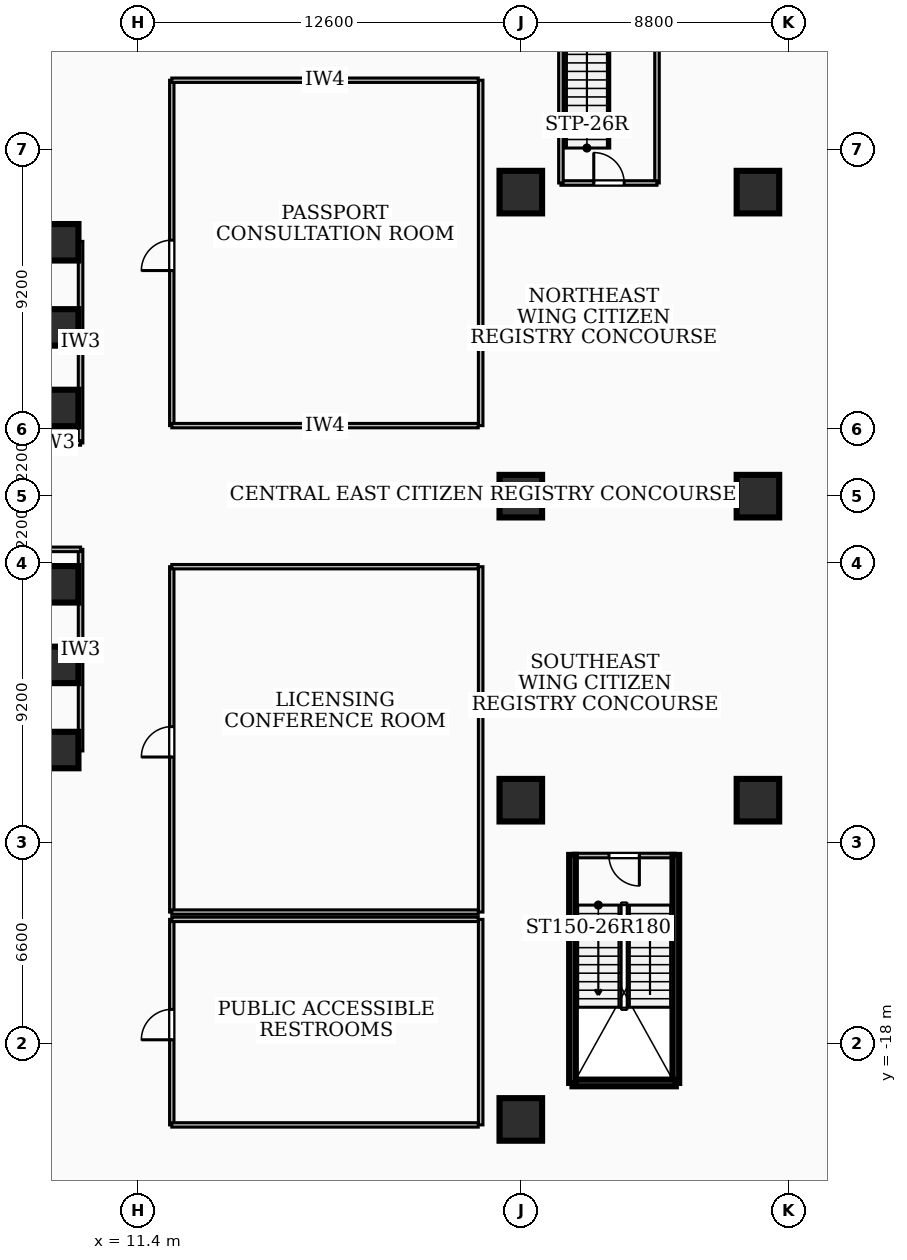
"""IFC4 building model, lengths in metres.
Left out: names, types, materials, properties, quantities, classifications, styles, units other than length and angle.
Written with IfcOpenShell. Run it as: python <this file> out.ifc"""

import sys

from ifc_helpers import new_model, si_unit, direction, frame, frame_2d, origin, origin_2d, place, context, subcontext, project, spatial, rectangle, extrude, element, fill, save


model = new_model("IFC4")
c1 = context("Model", 3, precision=1e-05, world=origin(), true_north=direction((0.0, 1.0)))
c2 = subcontext(c1, "Body", "Model", "MODEL_VIEW")
j1 = project(units=[si_unit("LENGTHUNIT", "METRE"), si_unit("PLANEANGLEUNIT", "RADIAN")], contexts=[c1])
p1 = place(None, origin())
s1 = spatial("IfcSite", under=j1, at=p1, CompositionType="ELEMENT")
p2 = place(p1, origin())
s2 = spatial("IfcBuilding", under=s1, at=p2, CompositionType="ELEMENT")
p3 = place(p2, frame((0.0, 0.0, 5.4)))
s3 = spatial("IfcBuildingStorey", under=s2, at=p3, CompositionType="ELEMENT", Elevation=5.4)
for number, where, z_axis, x_axis in (
    (1, (-8.78, 8.585, 0.0), (0.0, 0.0, 1.0), (1.0, 0.0, 0.0)),
    (2, (8.78, -8.585, 0.0), (0.0, 0.0, 1.0), (-1.0, 0.0, 0.0)),
):
    element("IfcWall", number, at=place(p3, frame(where, z_axis=z_axis, x_axis=x_axis)), inside=s3, PredefinedType="SHEAR", context=c2, shape_type="SweptSolid", body=[
        extrude(rectangle(XDim=17.56, YDim=0.55, at=frame_2d((8.78, 0.0))), origin(), (0.0, 0.0, 1.0), 4.36),
    ])
for number, where, z_axis, x_axis in (
    (3, (25.7, -19.3, 0.0), (0.0, 0.0, 1.0), (0.0, 1.0, 0.0)),
    (4, (29.1, -19.3, 0.0), (0.0, 0.0, 1.0), (0.0, 1.0, 0.0)),
):
    element("IfcWall", number, at=place(p3, frame(where, z_axis=z_axis, x_axis=x_axis)), inside=s3, PredefinedType="SOLIDWALL", context=c2, shape_type="SweptSolid", body=[
        extrude(rectangle(XDim=7.5, YDim=0.22, at=frame_2d((3.75, 0.0))), origin(), (0.0, 0.0, 1.0), 4.36),
    ])
p4 = place(p3, frame((25.7, -19.3, 0.0), z_axis=(0.0, 0.0, 1.0), x_axis=(1.0, 0.0, 0.0)))
e5 = element("IfcWall", 5, at=p4, inside=s3, PredefinedType="SOLIDWALL", context=c2, shape_type="SweptSolid", body=[
    extrude(rectangle(XDim=3.4, YDim=0.22, at=frame_2d((1.7, 0.0))), origin(), (0.0, 0.0, 1.0), 4.36),
])
for number, where, z_axis, x_axis in (
    (6, (8.85, -5.55, 0.0), (0.0, 0.0, 1.0), (1.0, 0.0, 0.0)),
    (7, (8.85, -2.9, 0.0), (0.0, 0.0, 1.0), (1.0, 0.0, 0.0)),
    (8, (8.85, 2.9, 0.0), (0.0, 0.0, 1.0), (1.0, 0.0, 0.0)),
    (9, (8.85, 5.55, 0.0), (0.0, 0.0, 1.0), (1.0, 0.0, 0.0)),
    (10, (8.85, -8.35, 0.0), (0.0, 0.0, 1.0), (1.0, 0.0, 0.0)),
    (11, (8.85, 8.35, 0.0), (0.0, 0.0, 1.0), (1.0, 0.0, 0.0)),
):
    element("IfcColumn", number, at=place(p3, frame(where, z_axis=z_axis, x_axis=x_axis)), inside=s3, PredefinedType="COLUMN", context=c2, shape_type="SweptSolid", body=[
        extrude(rectangle(XDim=1.2, YDim=1.2, at=origin_2d()), origin(), (0.0, 0.0, 1.0), 4.68),
    ])
for number, where, z_axis, x_axis in (
    (12, (31.8, -10.0, 0.0), (0.0, 0.0, 1.0), (1.0, 0.0, 0.0)),
    (13, (31.8, 0.0, 0.0), (0.0, 0.0, 1.0), (1.0, 0.0, 0.0)),
    (14, (31.8, 10.0, 0.0), (0.0, 0.0, 1.0), (1.0, 0.0, 0.0)),
    (15, (24.0, -10.0, 0.0), (0.0, 0.0, 1.0), (1.0, 0.0, 0.0)),
    (16, (24.0, 0.0, 0.0), (0.0, 0.0, 1.0), (1.0, 0.0, 0.0)),
    (17, (24.0, 10.0, 0.0), (0.0, 0.0, 1.0), (1.0, 0.0, 0.0)),
    (18, (24.0, -20.5, 0.0), (0.0, 0.0, 1.0), (1.0, 0.0, 0.0)),
):
    element("IfcColumn", number, at=place(p3, frame(where, z_axis=z_axis, x_axis=x_axis)), inside=s3, PredefinedType="COLUMN", context=c2, shape_type="SweptSolid", body=[
        extrude(rectangle(XDim=1.4, YDim=1.4, at=origin_2d()), origin(), (0.0, 0.0, 1.0), 4.68),
    ])
p5 = place(p3, frame((29.08, -11.82, 0.0), z_axis=(0.0, 0.0, 1.0), x_axis=(-1.0, 0.0, 0.0)))
e19 = element("IfcWall", 19, at=p5, inside=s3, PredefinedType="PARTITIONING", context=c2, shape_type="SweptSolid", body=[
    extrude(rectangle(XDim=3.36, YDim=0.15, at=frame_2d((1.68, 0.0))), origin(), (0.0, 0.0, 1.0), 4.36),
])
p6 = place(p5, frame((1.18, 0.0, 0.0)))
e20 = element("IfcOpeningElement", 20, at=p6, cuts=e19, PredefinedType="OPENING", context=c2, shape_type="SweptSolid", body=[
    extrude(rectangle(XDim=1.0, YDim=2.1, at=frame_2d((0.5, 1.05))), frame((0.0, 0.085, 0.0), z_axis=(0.0, -1.0, 0.0), x_axis=(1.0, 0.0, 0.0)), (0.0, 0.0, 1.0), 0.17),
])
for number, where, z_axis, x_axis in (
    (21, (25.32, 10.3, 0.0), (0.0, 0.0, 1.0), (0.0, 1.0, 0.0)),
    (22, (28.48, 10.3, 0.0), (0.0, 0.0, 1.0), (0.0, 1.0, 0.0)),
):
    element("IfcWall", number, at=place(p3, frame(where, z_axis=z_axis, x_axis=x_axis)), inside=s3, PredefinedType="PARTITIONING", context=c2, shape_type="SweptSolid", body=[
        extrude(rectangle(XDim=9.8, YDim=0.15, at=frame_2d((4.9, 0.0))), origin(), (0.0, 0.0, 1.0), 4.36),
    ])
p7 = place(p3, frame((25.32, 10.3, 0.0), z_axis=(0.0, 0.0, 1.0), x_axis=(1.0, 0.0, 0.0)))
e23 = element("IfcWall", 23, at=p7, inside=s3, PredefinedType="PARTITIONING", context=c2, shape_type="SweptSolid", body=[
    extrude(rectangle(XDim=3.16, YDim=0.15, at=frame_2d((1.58, 0.0))), origin(), (0.0, 0.0, 1.0), 3.37),
])
p8 = place(p7, frame((1.08, 0.0, 0.0)))
e24 = element("IfcOpeningElement", 24, at=p8, cuts=e23, PredefinedType="OPENING", context=c2, shape_type="SweptSolid", body=[
    extrude(rectangle(XDim=1.0, YDim=2.1, at=frame_2d((0.5, 1.05))), frame((0.0, 0.085, 0.0), z_axis=(0.0, -1.0, 0.0), x_axis=(1.0, 0.0, 0.0)), (0.0, 0.0, 1.0), 0.17),
])
p9 = place(p3, frame((9.52, 1.75, 0.0), z_axis=(0.0, 0.0, 1.0), x_axis=(0.0, 1.0, 0.0)))
e25 = element("IfcWall", 25, at=p9, inside=s3, PredefinedType="PARTITIONING", context=c2, shape_type="SweptSolid", body=[
    extrude(rectangle(XDim=6.63, YDim=0.15, at=frame_2d((3.315, 0.0))), origin(), (0.0, 0.0, 1.0), 3.37),
])
p10 = place(p3, frame((7.85, 1.75, 0.0), z_axis=(0.0, 0.0, 1.0), x_axis=(1.0, 0.0, 0.0)))
e26 = element("IfcWall", 26, at=p10, inside=s3, PredefinedType="PARTITIONING", context=c2, shape_type="SweptSolid", body=[
    extrude(rectangle(XDim=1.67, YDim=0.15, at=frame_2d((0.835, 0.0))), origin(), (0.0, 0.0, 1.0), 3.425),
])
p11 = place(p3, frame((9.52, -8.38, 0.0), z_axis=(0.0, 0.0, 1.0), x_axis=(0.0, 1.0, 0.0)))
e27 = element("IfcWall", 27, at=p11, inside=s3, PredefinedType="PARTITIONING", context=c2, shape_type="SweptSolid", body=[
    extrude(rectangle(XDim=6.63, YDim=0.15, at=frame_2d((3.315, 0.0))), origin(), (0.0, 0.0, 1.0), 3.37),
])
p12 = place(p3, frame((7.85, -1.75, 0.0), z_axis=(0.0, 0.0, 1.0), x_axis=(1.0, 0.0, 0.0)))
e28 = element("IfcWall", 28, at=p12, inside=s3, PredefinedType="PARTITIONING", context=c2, shape_type="SweptSolid", body=[
    extrude(rectangle(XDim=1.67, YDim=0.15, at=frame_2d((0.835, 0.0))), origin(), (0.0, 0.0, 1.0), 3.425),
])
p13 = place(p3, frame((12.52, 2.32, 0.0), z_axis=(0.0, 0.0, 1.0), x_axis=(0.0, 1.0, 0.0)))
e29 = element("IfcWall", 29, at=p13, inside=s3, PredefinedType="PARTITIONING", context=c2, shape_type="SweptSolid", body=[
    extrude(rectangle(XDim=11.36, YDim=0.145, at=frame_2d((5.68, 0.0))), origin(), (0.0, 0.0, 1.0), 3.37),
])
p14 = place(p13, frame((5.1, 0.0, 0.0)))
e30 = element("IfcOpeningElement", 30, at=p14, cuts=e29, PredefinedType="OPENING", context=c2, shape_type="SweptSolid", body=[
    extrude(rectangle(XDim=1.0, YDim=2.1, at=frame_2d((0.5, 1.05))), frame((0.0, 0.083, 0.0), z_axis=(0.0, -1.0, 0.0), x_axis=(1.0, 0.0, 0.0)), (0.0, 0.0, 1.0), 0.165),
])
for number, where, z_axis, x_axis in (
    (31, (12.52, 2.32, 0.0), (0.0, 0.0, 1.0), (1.0, 0.0, 0.0)),
    (32, (12.52, 13.68, 0.0), (0.0, 0.0, 1.0), (1.0, 0.0, 0.0)),
):
    element("IfcWall", number, at=place(p3, frame(where, z_axis=z_axis, x_axis=x_axis)), inside=s3, PredefinedType="PARTITIONING", context=c2, shape_type="SweptSolid", body=[
        extrude(rectangle(XDim=10.08, YDim=0.145, at=frame_2d((5.04, 0.0))), origin(), (0.0, 0.0, 1.0), 4.36),
    ])
p15 = place(p3, frame((22.68, 2.32, 0.0), z_axis=(0.0, 0.0, 1.0), x_axis=(0.0, 1.0, 0.0)))
e33 = element("IfcWall", 33, at=p15, inside=s3, PredefinedType="PARTITIONING", context=c2, shape_type="SweptSolid", body=[
    extrude(rectangle(XDim=11.36, YDim=0.15, at=frame_2d((5.68, 0.0))), origin(), (0.0, 0.0, 1.0), 3.37),
])
p16 = place(p3, frame((12.52, -13.68, 0.0), z_axis=(0.0, 0.0, 1.0), x_axis=(0.0, 1.0, 0.0)))
e34 = element("IfcWall", 34, at=p16, inside=s3, PredefinedType="PARTITIONING", context=c2, shape_type="SweptSolid", body=[
    extrude(rectangle(XDim=11.36, YDim=0.145, at=frame_2d((5.68, 0.0))), origin(), (0.0, 0.0, 1.0), 3.37),
])
p17 = place(p16, frame((5.1, 0.0, 0.0)))
e35 = element("IfcOpeningElement", 35, at=p17, cuts=e34, PredefinedType="OPENING", context=c2, shape_type="SweptSolid", body=[
    extrude(rectangle(XDim=1.0, YDim=2.1, at=frame_2d((0.5, 1.05))), frame((0.0, 0.083, 0.0), z_axis=(0.0, -1.0, 0.0), x_axis=(1.0, 0.0, 0.0)), (0.0, 0.0, 1.0), 0.165),
])
p18 = place(p3, frame((12.52, -13.68, 0.0), z_axis=(0.0, 0.0, 1.0), x_axis=(1.0, 0.0, 0.0)))
e36 = element("IfcWall", 36, at=p18, inside=s3, PredefinedType="PARTITIONING", context=c2, shape_type="SweptSolid", body=[
    extrude(rectangle(XDim=10.08, YDim=0.145, at=frame_2d((5.04, 0.0))), origin(), (0.0, 0.0, 1.0), 4.36),
])
p19 = place(p3, frame((12.52, -2.32, 0.0), z_axis=(0.0, 0.0, 1.0), x_axis=(1.0, 0.0, 0.0)))
e37 = element("IfcWall", 37, at=p19, inside=s3, PredefinedType="PARTITIONING", context=c2, shape_type="SweptSolid", body=[
    extrude(rectangle(XDim=10.08, YDim=0.145, at=frame_2d((5.04, 0.0))), origin(), (0.0, 0.0, 1.0), 3.37),
])
p20 = place(p3, frame((22.68, -13.68, 0.0), z_axis=(0.0, 0.0, 1.0), x_axis=(0.0, 1.0, 0.0)))
e38 = element("IfcWall", 38, at=p20, inside=s3, PredefinedType="PARTITIONING", context=c2, shape_type="SweptSolid", body=[
    extrude(rectangle(XDim=11.36, YDim=0.15, at=frame_2d((5.68, 0.0))), origin(), (0.0, 0.0, 1.0), 3.37),
])
p21 = place(p3, frame((12.52, -20.68, 0.0), z_axis=(0.0, 0.0, 1.0), x_axis=(0.0, 1.0, 0.0)))
e39 = element("IfcWall", 39, at=p21, inside=s3, PredefinedType="PARTITIONING", context=c2, shape_type="SweptSolid", body=[
    extrude(rectangle(XDim=6.76, YDim=0.145, at=frame_2d((3.38, 0.0))), origin(), (0.0, 0.0, 1.0), 4.36),
])
p22 = place(p21, frame((2.8, 0.0, 0.0)))
e40 = element("IfcOpeningElement", 40, at=p22, cuts=e39, PredefinedType="OPENING", context=c2, shape_type="SweptSolid", body=[
    extrude(rectangle(XDim=1.0, YDim=2.1, at=frame_2d((0.5, 1.05))), frame((0.0, 0.083, 0.0), z_axis=(0.0, -1.0, 0.0), x_axis=(1.0, 0.0, 0.0)), (0.0, 0.0, 1.0), 0.165),
])
for number, where, z_axis, x_axis in (
    (41, (12.52, -20.68, 0.0), (0.0, 0.0, 1.0), (1.0, 0.0, 0.0)),
    (42, (12.52, -13.92, 0.0), (0.0, 0.0, 1.0), (1.0, 0.0, 0.0)),
):
    element("IfcWall", number, at=place(p3, frame(where, z_axis=z_axis, x_axis=x_axis)), inside=s3, PredefinedType="PARTITIONING", context=c2, shape_type="SweptSolid", body=[
        extrude(rectangle(XDim=10.08, YDim=0.145, at=frame_2d((5.04, 0.0))), origin(), (0.0, 0.0, 1.0), 4.36),
    ])
p23 = place(p3, frame((22.68, -20.68, 0.0), z_axis=(0.0, 0.0, 1.0), x_axis=(0.0, 1.0, 0.0)))
e43 = element("IfcWall", 43, at=p23, inside=s3, PredefinedType="PARTITIONING", context=c2, shape_type="SweptSolid", body=[
    extrude(rectangle(XDim=6.76, YDim=0.15, at=frame_2d((3.38, 0.0))), origin(), (0.0, 0.0, 1.0), 4.36),
])
p24 = place(p6, origin())
e44 = element("IfcDoor", 44, at=p24, inside=s3, OperationType="SINGLE_SWING_LEFT", PredefinedType="DOOR", context=c2, shape_type="SweptSolid", body=[
    extrude(rectangle(XDim=1.0, YDim=2.1, at=frame_2d((0.5, 1.05))), frame((0.0, 0.025, 0.0), z_axis=(0.0, -1.0, 0.0), x_axis=(1.0, 0.0, 0.0)), (0.0, 0.0, 1.0), 0.05),
])
fill(e20, e44)
p25 = place(p8, origin())
e45 = element("IfcDoor", 45, at=p25, inside=s3, OperationType="SINGLE_SWING_LEFT", PredefinedType="DOOR", context=c2, shape_type="SweptSolid", body=[
    extrude(rectangle(XDim=1.0, YDim=2.1, at=frame_2d((0.5, 1.05))), frame((0.0, 0.025, 0.0), z_axis=(0.0, -1.0, 0.0), x_axis=(1.0, 0.0, 0.0)), (0.0, 0.0, 1.0), 0.05),
])
fill(e24, e45)
p26 = place(p14, origin())
e46 = element("IfcDoor", 46, at=p26, inside=s3, OperationType="SINGLE_SWING_LEFT", PredefinedType="DOOR", context=c2, shape_type="SweptSolid", body=[
    extrude(rectangle(XDim=1.0, YDim=2.1, at=frame_2d((0.5, 1.05))), frame((0.0, 0.025, 0.0), z_axis=(0.0, -1.0, 0.0), x_axis=(1.0, 0.0, 0.0)), (0.0, 0.0, 1.0), 0.05),
])
fill(e30, e46)
p27 = place(p17, origin())
e47 = element("IfcDoor", 47, at=p27, inside=s3, OperationType="SINGLE_SWING_LEFT", PredefinedType="DOOR", context=c2, shape_type="SweptSolid", body=[
    extrude(rectangle(XDim=1.0, YDim=2.1, at=frame_2d((0.5, 1.05))), frame((0.0, 0.025, 0.0), z_axis=(0.0, -1.0, 0.0), x_axis=(1.0, 0.0, 0.0)), (0.0, 0.0, 1.0), 0.05),
])
fill(e35, e47)
p28 = place(p22, origin())
e48 = element("IfcDoor", 48, at=p28, inside=s3, OperationType="SINGLE_SWING_LEFT", PredefinedType="DOOR", context=c2, shape_type="SweptSolid", body=[
    extrude(rectangle(XDim=1.0, YDim=2.1, at=frame_2d((0.5, 1.05))), frame((0.0, 0.025, 0.0), z_axis=(0.0, -1.0, 0.0), x_axis=(1.0, 0.0, 0.0)), (0.0, 0.0, 1.0), 0.05),
])
fill(e40, e48)
save(model, sys.argv[1])
